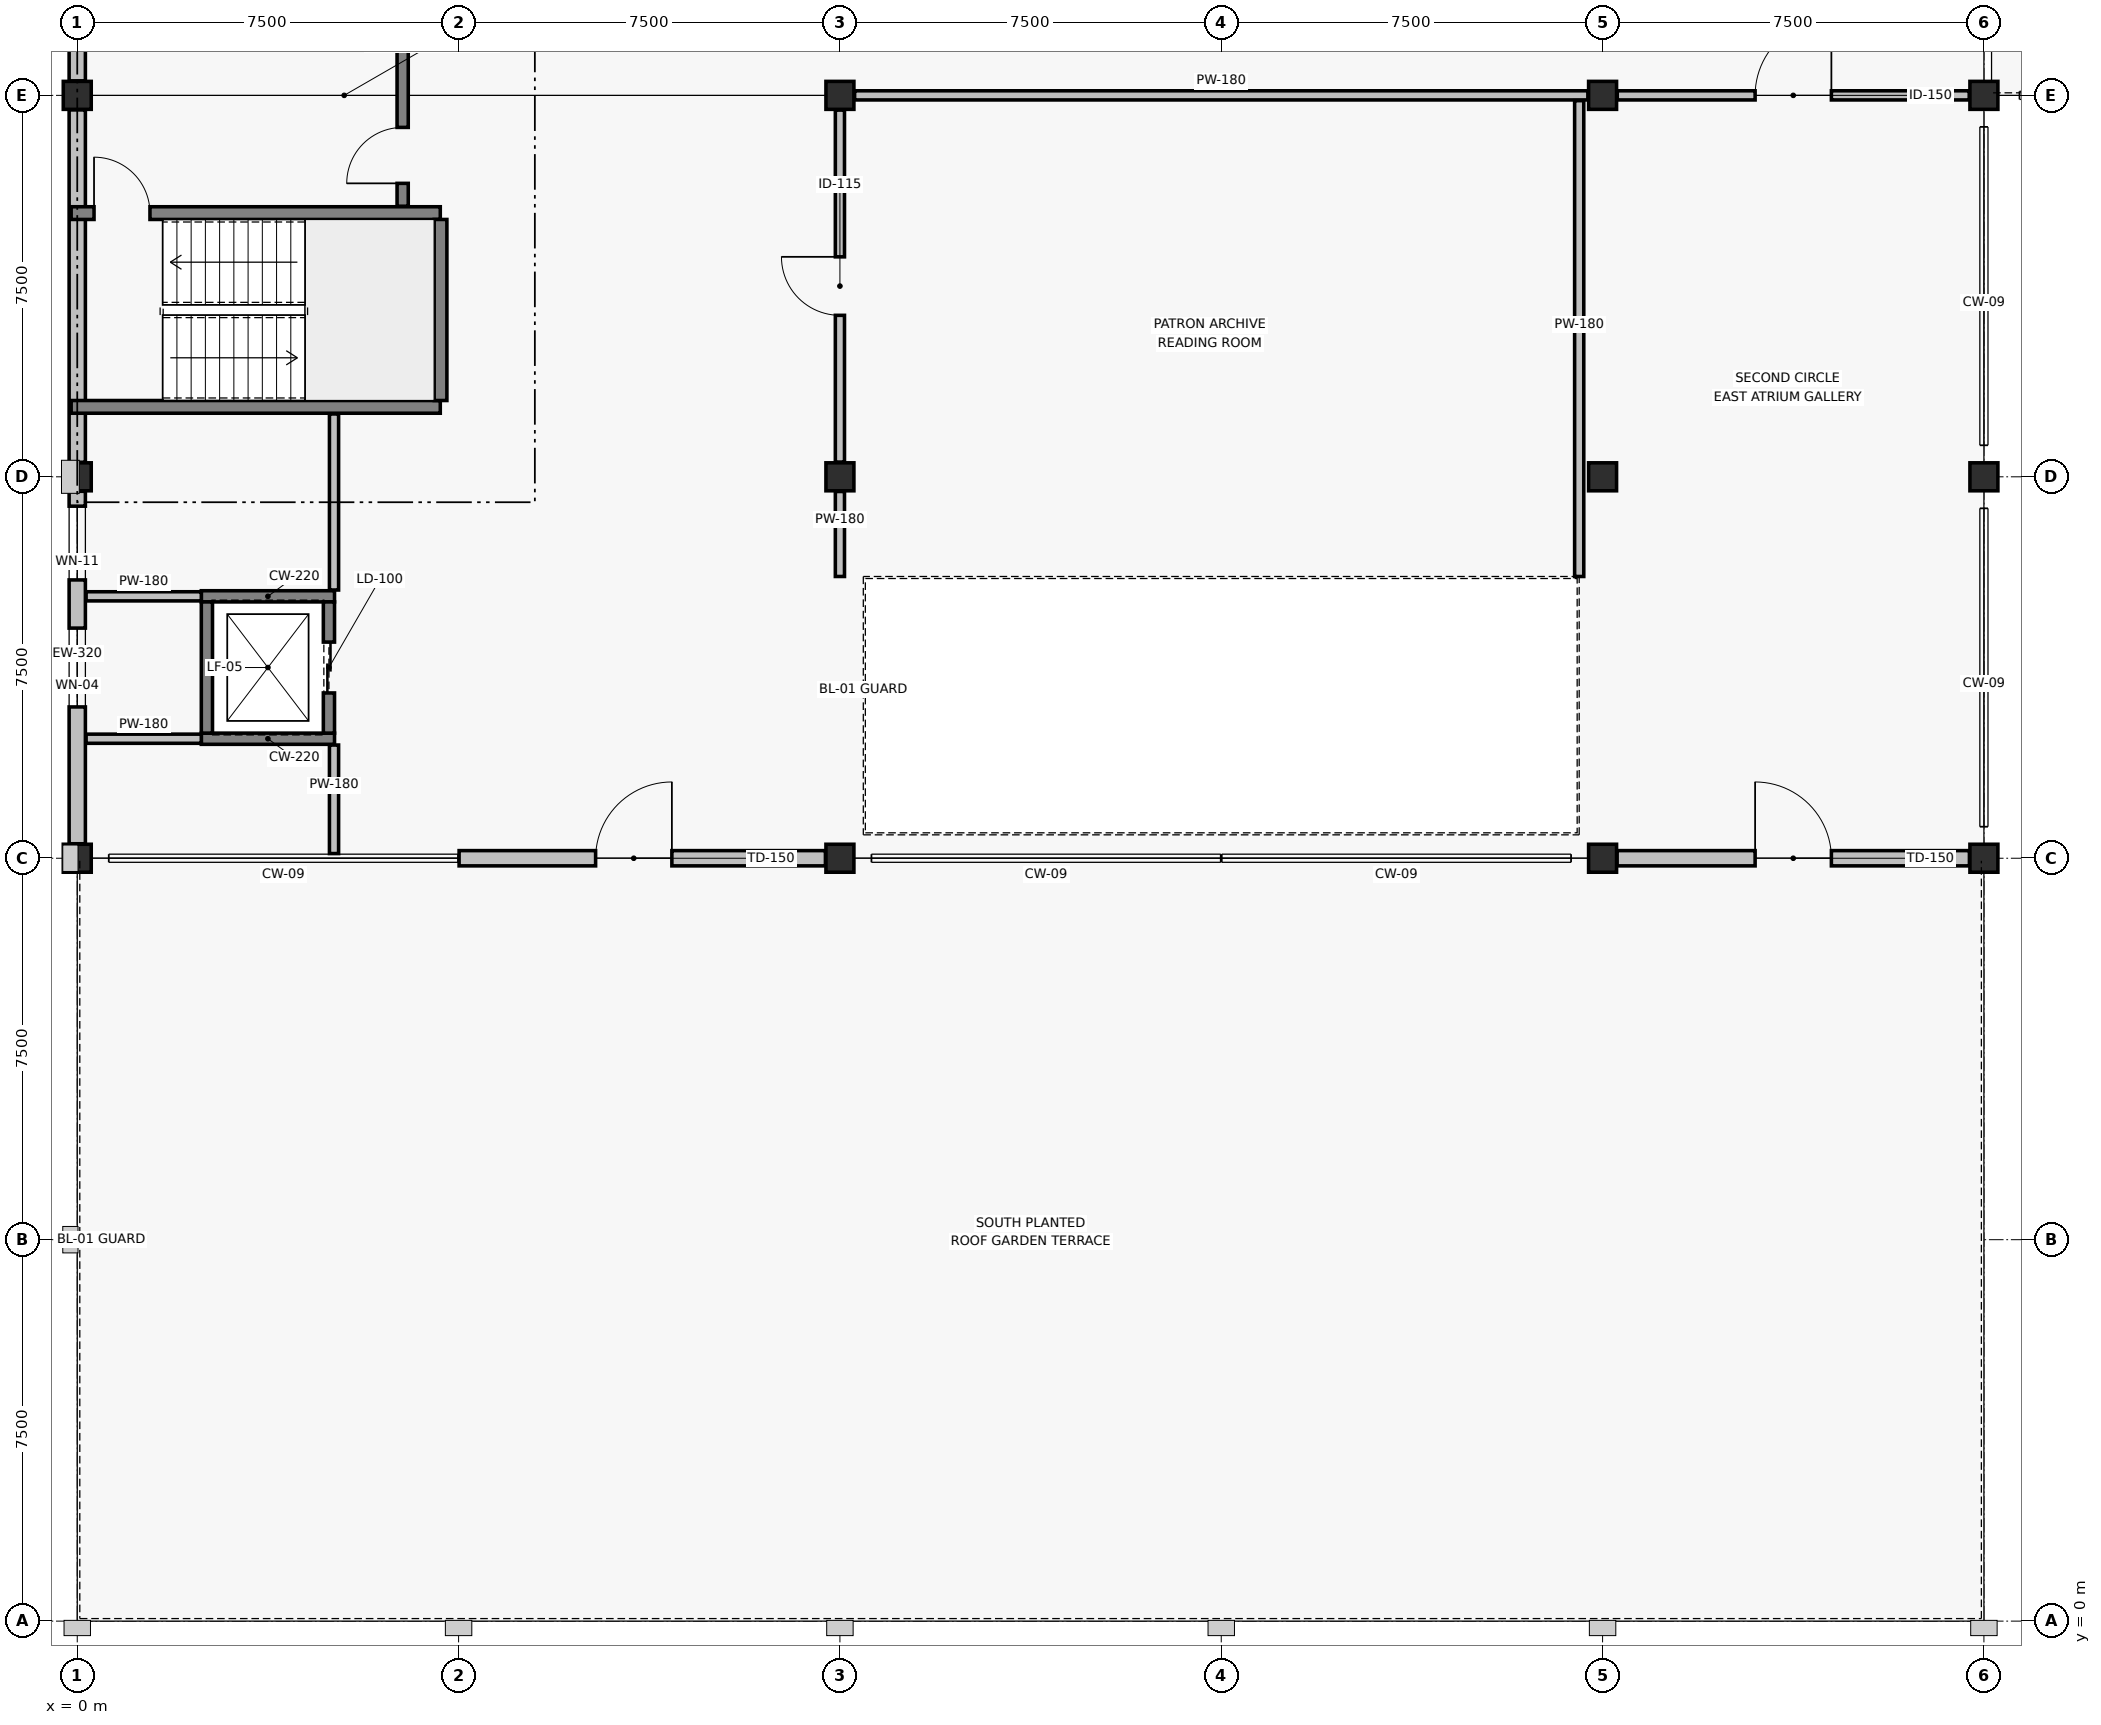
"""IFC4 building model, lengths in metres.
Left out: names, types, materials, properties, quantities, classifications, styles, units other than length and angle.
Written with IfcOpenShell. Run it as: python <this file> out.ifc"""

import sys

from ifc_helpers import new_model, si_unit, direction, frame, frame_2d, origin, origin_2d, place, context, subcontext, project, spatial, rectangle, extrude, element, fill, save


model = new_model("IFC4")
c1 = context("Model", 3, precision=1e-05, world=origin(), true_north=direction((0.0, 1.0)))
c2 = subcontext(c1, "Body", "Model", "MODEL_VIEW")
j1 = project(units=[si_unit("LENGTHUNIT", "METRE"), si_unit("PLANEANGLEUNIT", "RADIAN")], contexts=[c1])
p1 = place(None, origin())
s1 = spatial("IfcSite", under=j1, at=p1, CompositionType="ELEMENT")
p2 = place(p1, origin())
s2 = spatial("IfcBuilding", under=s1, at=p2, CompositionType="ELEMENT")
p3 = place(p2, frame((0.0, 0.0, 13.2)))
s3 = spatial("IfcBuildingStorey", under=s2, at=p3, CompositionType="ELEMENT", Elevation=13.2)
for number, where, z_axis, x_axis in (
    (1, (0.0, 15.0, 0.0), (0.0, 0.0, 1.0), (1.0, 0.0, 0.0)),
    (2, (0.0, 22.5, 0.0), (0.0, 0.0, 1.0), (1.0, 0.0, 0.0)),
    (3, (0.0, 30.0, 0.0), (0.0, 0.0, 1.0), (1.0, 0.0, 0.0)),
    (4, (15.0, 15.0, 0.0), (0.0, 0.0, 1.0), (1.0, 0.0, 0.0)),
    (5, (15.0, 22.5, 0.0), (0.0, 0.0, 1.0), (1.0, 0.0, 0.0)),
    (6, (15.0, 30.0, 0.0), (0.0, 0.0, 1.0), (1.0, 0.0, 0.0)),
    (7, (30.0, 15.0, 0.0), (0.0, 0.0, 1.0), (1.0, 0.0, 0.0)),
    (8, (30.0, 22.5, 0.0), (0.0, 0.0, 1.0), (1.0, 0.0, 0.0)),
    (9, (30.0, 30.0, 0.0), (0.0, 0.0, 1.0), (1.0, 0.0, 0.0)),
    (10, (37.5, 15.0, 0.0), (0.0, 0.0, 1.0), (1.0, 0.0, 0.0)),
    (11, (37.5, 22.5, 0.0), (0.0, 0.0, 1.0), (1.0, 0.0, 0.0)),
    (12, (37.5, 30.0, 0.0), (0.0, 0.0, 1.0), (1.0, 0.0, 0.0)),
):
    element("IfcColumn", number, at=place(p3, frame(where, z_axis=z_axis, x_axis=x_axis)), inside=s3, PredefinedType="COLUMN", context=c2, shape_type="SweptSolid", body=[
        extrude(rectangle(XDim=0.55, YDim=0.55, at=origin_2d()), origin(), (0.0, 0.0, 1.0), 3.9),
    ])
p4 = place(p3, frame((7.51, 15.0, 0.0), z_axis=(0.0, 0.0, 1.0), x_axis=(1.0, 0.0, 0.0)))
e13 = element("IfcWall", 13, at=p4, inside=s3, PredefinedType="SOLIDWALL", context=c2, shape_type="SweptSolid", body=[
    extrude(rectangle(XDim=7.205, YDim=0.3, at=frame_2d((3.603, 0.0))), origin(), (0.0, 0.0, 1.0), 2.59),
])
p5 = place(p4, frame((2.685, 0.0, 0.0)))
e14 = element("IfcOpeningElement", 14, at=p5, cuts=e13, PredefinedType="OPENING", context=c2, shape_type="SweptSolid", body=[
    extrude(rectangle(XDim=1.5, YDim=2.15, at=frame_2d((0.75, 1.075))), frame((0.0, 0.16, 0.0), z_axis=(0.0, -1.0, 0.0), x_axis=(1.0, 0.0, 0.0)), (0.0, 0.0, 1.0), 0.32),
])
p6 = place(p3, frame((30.285, 15.0, 0.0), z_axis=(0.0, 0.0, 1.0), x_axis=(1.0, 0.0, 0.0)))
e15 = element("IfcWall", 15, at=p6, inside=s3, PredefinedType="SOLIDWALL", context=c2, shape_type="SweptSolid", body=[
    extrude(rectangle(XDim=6.93, YDim=0.3, at=frame_2d((3.465, 0.0))), origin(), (0.0, 0.0, 1.0), 2.59),
])
p7 = place(p6, frame((2.715, 0.0, 0.0)))
e16 = element("IfcOpeningElement", 16, at=p7, cuts=e15, PredefinedType="OPENING", context=c2, shape_type="SweptSolid", body=[
    extrude(rectangle(XDim=1.5, YDim=2.15, at=frame_2d((0.75, 1.075))), frame((0.0, 0.16, 0.0), z_axis=(0.0, -1.0, 0.0), x_axis=(1.0, 0.0, 0.0)), (0.0, 0.0, 1.0), 0.32),
])
p8 = place(p3, frame((0.0, 15.285, 0.0), z_axis=(0.0, 0.0, 1.0), x_axis=(0.0, 1.0, 0.0)))
e17 = element("IfcWall", 17, at=p8, inside=s3, PredefinedType="SOLIDWALL", context=c2, shape_type="SweptSolid", body=[
    extrude(rectangle(XDim=6.93, YDim=0.32, at=frame_2d((3.465, 0.0))), origin(), (0.0, 0.0, 1.0), 2.59),
])
p9 = place(p8, frame((2.69, 0.0, 0.6)))
e18 = element("IfcOpeningElement", 18, at=p9, cuts=e17, PredefinedType="OPENING", context=c2, shape_type="SweptSolid", body=[
    extrude(rectangle(XDim=1.55, YDim=1.8, at=frame_2d((0.775, 0.9))), frame((0.0, 0.17, 0.0), z_axis=(0.0, -1.0, 0.0), x_axis=(1.0, 0.0, 0.0)), (0.0, 0.0, 1.0), 0.34),
])
p10 = place(p8, frame((5.188, 0.0, 0.6)))
e19 = element("IfcOpeningElement", 19, at=p10, cuts=e17, PredefinedType="OPENING", context=c2, shape_type="SweptSolid", body=[
    extrude(rectangle(XDim=1.45, YDim=1.3, at=frame_2d((0.725, 0.65))), frame((0.0, 0.17, 0.0), z_axis=(0.0, -1.0, 0.0), x_axis=(1.0, 0.0, 0.0)), (0.0, 0.0, 1.0), 0.34),
])
for number, where, z_axis, x_axis in (
    (20, (0.0, 22.785, 0.0), (0.0, 0.0, 1.0), (0.0, 1.0, 0.0)),
    (21, (0.0, 30.285, 0.0), (0.0, 0.0, 1.0), (0.0, 1.0, 0.0)),
):
    element("IfcWall", number, at=place(p3, frame(where, z_axis=z_axis, x_axis=x_axis)), inside=s3, PredefinedType="SOLIDWALL", context=c2, shape_type="SweptSolid", body=[
        extrude(rectangle(XDim=6.93, YDim=0.32, at=frame_2d((3.465, 0.0))), origin(), (0.0, 0.0, 1.0), 2.59),
    ])
p11 = place(p3, frame((-0.12, 23.875, 0.0), z_axis=(0.0, 0.0, 1.0), x_axis=(1.0, 0.0, 0.0)))
e22 = element("IfcWall", 22, at=p11, inside=s3, PredefinedType="SOLIDWALL", context=c2, shape_type="SweptSolid", body=[
    extrude(rectangle(XDim=7.26, YDim=0.25, at=frame_2d((3.63, 0.0))), origin(), (0.0, 0.0, 1.0), 3.62),
])
p12 = place(p3, frame((-0.12, 27.685, 0.0), z_axis=(0.0, 0.0, 1.0), x_axis=(1.0, 0.0, 0.0)))
e23 = element("IfcWall", 23, at=p12, inside=s3, PredefinedType="SOLIDWALL", context=c2, shape_type="SweptSolid", body=[
    extrude(rectangle(XDim=7.26, YDim=0.25, at=frame_2d((3.63, 0.0))), origin(), (0.0, 0.0, 1.0), 3.62),
])
p13 = place(p12, frame((0.45, 0.0, 0.0)))
e24 = element("IfcOpeningElement", 24, at=p13, cuts=e23, PredefinedType="OPENING", context=c2, shape_type="SweptSolid", body=[
    extrude(rectangle(XDim=1.1, YDim=2.15, at=frame_2d((0.55, 1.075))), frame((0.0, 0.135, 0.0), z_axis=(0.0, -1.0, 0.0), x_axis=(1.0, 0.0, 0.0)), (0.0, 0.0, 1.0), 0.27),
])
p14 = place(p3, frame((7.145, 24.0, 0.0), z_axis=(0.0, 0.0, 1.0), x_axis=(0.0, 1.0, 0.0)))
e25 = element("IfcWall", 25, at=p14, inside=s3, PredefinedType="SOLIDWALL", context=c2, shape_type="SweptSolid", body=[
    extrude(rectangle(XDim=3.56, YDim=0.25, at=frame_2d((1.78, 0.0))), origin(), (0.0, 0.0, 1.0), 3.62),
])
for number, where, z_axis, x_axis in (
    (26, (2.44, 17.35, 0.0), (0.0, 0.0, 1.0), (1.0, 0.0, 0.0)),
    (27, (2.44, 20.15, 0.0), (0.0, 0.0, 1.0), (1.0, 0.0, 0.0)),
):
    element("IfcWall", number, at=place(p3, frame(where, z_axis=z_axis, x_axis=x_axis)), inside=s3, PredefinedType="SOLIDWALL", context=c2, shape_type="SweptSolid", body=[
        extrude(rectangle(XDim=2.62, YDim=0.22, at=frame_2d((1.31, 0.0))), origin(), (0.0, 0.0, 1.0), 3.62),
    ])
p15 = place(p3, frame((2.55, 17.46, 0.0), z_axis=(0.0, 0.0, 1.0), x_axis=(0.0, 1.0, 0.0)))
e28 = element("IfcWall", 28, at=p15, inside=s3, PredefinedType="SOLIDWALL", context=c2, shape_type="SweptSolid", body=[
    extrude(rectangle(XDim=2.58, YDim=0.22, at=frame_2d((1.29, 0.0))), origin(), (0.0, 0.0, 1.0), 3.62),
])
p16 = place(p3, frame((4.95, 17.46, 0.0), z_axis=(0.0, 0.0, 1.0), x_axis=(0.0, 1.0, 0.0)))
e29 = element("IfcWall", 29, at=p16, inside=s3, PredefinedType="SOLIDWALL", context=c2, shape_type="SweptSolid", body=[
    extrude(rectangle(XDim=2.58, YDim=0.22, at=frame_2d((1.29, 0.0))), origin(), (0.0, 0.0, 1.0), 3.62),
])
p17 = place(p16, frame((0.79, 0.0, 0.0)))
e30 = element("IfcOpeningElement", 30, at=p17, cuts=e29, PredefinedType="OPENING", context=c2, shape_type="SweptSolid", body=[
    extrude(rectangle(XDim=1.0, YDim=2.15, at=frame_2d((0.5, 1.075))), frame((0.0, 0.12, 0.0), z_axis=(0.0, -1.0, 0.0), x_axis=(1.0, 0.0, 0.0)), (0.0, 0.0, 1.0), 0.24),
])
p18 = place(p3, frame((6.4, 27.82, 0.0), z_axis=(0.0, 0.0, 1.0), x_axis=(0.0, 1.0, 0.0)))
e31 = element("IfcWall", 31, at=p18, inside=s3, PredefinedType="SOLIDWALL", context=c2, shape_type="SweptSolid", body=[
    extrude(rectangle(XDim=4.31, YDim=0.22, at=frame_2d((2.155, 0.0))), origin(), (0.0, 0.0, 1.0), 3.62),
])
p19 = place(p18, frame((0.45, 0.0, 0.0)))
e32 = element("IfcOpeningElement", 32, at=p19, cuts=e31, PredefinedType="OPENING", context=c2, shape_type="SweptSolid", body=[
    extrude(rectangle(XDim=1.1, YDim=2.15, at=frame_2d((0.55, 1.075))), frame((0.0, 0.12, 0.0), z_axis=(0.0, -1.0, 0.0), x_axis=(1.0, 0.0, 0.0)), (0.0, 0.0, 1.0), 0.24),
])
for number, where, z_axis, x_axis in (
    (33, (0.174, 17.35, 0.0), (0.0, 0.0, 1.0), (1.0, 0.0, 0.0)),
    (34, (0.174, 20.15, 0.0), (0.0, 0.0, 1.0), (1.0, 0.0, 0.0)),
):
    element("IfcWall", number, at=place(p3, frame(where, z_axis=z_axis, x_axis=x_axis)), inside=s3, PredefinedType="PARTITIONING", context=c2, shape_type="SweptSolid", body=[
        extrude(rectangle(XDim=2.266, YDim=0.18, at=frame_2d((1.133, 0.0))), origin(), (0.0, 0.0, 1.0), 2.97),
    ])
p20 = place(p3, frame((5.05, 15.092, 0.0), z_axis=(0.0, 0.0, 1.0), x_axis=(0.0, 1.0, 0.0)))
e35 = element("IfcWall", 35, at=p20, inside=s3, PredefinedType="PARTITIONING", context=c2, shape_type="SweptSolid", body=[
    extrude(rectangle(XDim=2.134, YDim=0.18, at=frame_2d((1.067, 0.0))), origin(), (0.0, 0.0, 1.0), 2.59),
])
p21 = place(p3, frame((5.05, 20.274, 0.0), z_axis=(0.0, 0.0, 1.0), x_axis=(0.0, 1.0, 0.0)))
e36 = element("IfcWall", 36, at=p21, inside=s3, PredefinedType="PARTITIONING", context=c2, shape_type="SweptSolid", body=[
    extrude(rectangle(XDim=3.462, YDim=0.18, at=frame_2d((1.731, 0.0))), origin(), (0.0, 0.0, 1.0), 2.59),
])
p22 = place(p3, frame((15.289, 30.0, 0.0), z_axis=(0.0, 0.0, 1.0), x_axis=(1.0, 0.0, 0.0)))
e37 = element("IfcWall", 37, at=p22, inside=s3, PredefinedType="PARTITIONING", context=c2, shape_type="SweptSolid", body=[
    extrude(rectangle(XDim=14.422, YDim=0.18, at=frame_2d((7.211, 0.0))), origin(), (0.0, 0.0, 1.0), 2.59),
])
p23 = place(p3, frame((30.289, 30.0, 0.0), z_axis=(0.0, 0.0, 1.0), x_axis=(1.0, 0.0, 0.0)))
e38 = element("IfcWall", 38, at=p23, inside=s3, PredefinedType="PARTITIONING", context=c2, shape_type="SweptSolid", body=[
    extrude(rectangle(XDim=6.922, YDim=0.18, at=frame_2d((3.461, 0.0))), origin(), (0.0, 0.0, 1.0), 2.59),
])
p24 = place(p23, frame((2.711, 0.0, 0.0)))
e39 = element("IfcOpeningElement", 39, at=p24, cuts=e38, PredefinedType="OPENING", context=c2, shape_type="SweptSolid", body=[
    extrude(rectangle(XDim=1.5, YDim=2.16, at=frame_2d((0.75, 1.08))), frame((0.0, 0.1, 0.0), z_axis=(0.0, -1.0, 0.0), x_axis=(1.0, 0.0, 0.0)), (0.0, 0.0, 1.0), 0.2),
])
p25 = place(p3, frame((29.54, 20.54, 0.0), z_axis=(0.0, 0.0, 1.0), x_axis=(0.0, 1.0, 0.0)))
e40 = element("IfcWall", 40, at=p25, inside=s3, PredefinedType="PARTITIONING", context=c2, shape_type="SweptSolid", body=[
    extrude(rectangle(XDim=9.356, YDim=0.18, at=frame_2d((4.678, 0.0))), origin(), (0.0, 0.0, 1.0), 2.59),
])
p26 = place(p3, frame((15.0, 20.54, 0.0), z_axis=(0.0, 0.0, 1.0), x_axis=(0.0, 1.0, 0.0)))
e41 = element("IfcWall", 41, at=p26, inside=s3, PredefinedType="PARTITIONING", context=c2, shape_type="SweptSolid", body=[
    extrude(rectangle(XDim=1.671, YDim=0.18, at=frame_2d((0.835, 0.0))), origin(), (0.0, 0.0, 1.0), 2.59),
])
p27 = place(p3, frame((15.0, 22.789, 0.0), z_axis=(0.0, 0.0, 1.0), x_axis=(0.0, 1.0, 0.0)))
e42 = element("IfcWall", 42, at=p27, inside=s3, PredefinedType="PARTITIONING", context=c2, shape_type="SweptSolid", body=[
    extrude(rectangle(XDim=6.922, YDim=0.18, at=frame_2d((3.461, 0.0))), origin(), (0.0, 0.0, 1.0), 2.59),
])
p28 = place(p27, frame((2.886, 0.0, 0.0)))
e43 = element("IfcOpeningElement", 43, at=p28, cuts=e42, PredefinedType="OPENING", context=c2, shape_type="SweptSolid", body=[
    extrude(rectangle(XDim=1.15, YDim=2.14, at=frame_2d((0.575, 1.07))), frame((0.0, 0.1, 0.0), z_axis=(0.0, -1.0, 0.0), x_axis=(1.0, 0.0, 0.0)), (0.0, 0.0, 1.0), 0.2),
])
p29 = place(p5, frame((1.5, 0.0, 0.0), z_axis=(0.0, 0.0, 1.0), x_axis=(-1.0, 0.0, 0.0)))
e44 = element("IfcDoor", 44, at=p29, inside=s3, OperationType="SINGLE_SWING_LEFT", PredefinedType="DOOR", context=c2, shape_type="SweptSolid", body=[
    extrude(rectangle(XDim=1.5, YDim=2.15, at=frame_2d((0.75, 1.075))), frame((0.0, 0.025, 0.0), z_axis=(0.0, -1.0, 0.0), x_axis=(1.0, 0.0, 0.0)), (0.0, 0.0, 1.0), 0.05),
])
fill(e14, e44)
p30 = place(p7, frame((1.5, 0.0, 0.0), z_axis=(0.0, 0.0, 1.0), x_axis=(-1.0, 0.0, 0.0)))
e45 = element("IfcDoor", 45, at=p30, inside=s3, OperationType="SINGLE_SWING_RIGHT", PredefinedType="DOOR", context=c2, shape_type="SweptSolid", body=[
    extrude(rectangle(XDim=1.5, YDim=2.15, at=frame_2d((0.75, 1.075))), frame((0.0, 0.025, 0.0), z_axis=(0.0, -1.0, 0.0), x_axis=(1.0, 0.0, 0.0)), (0.0, 0.0, 1.0), 0.05),
])
fill(e16, e45)
p31 = place(p9, origin())
e46 = element("IfcWindow", 46, at=p31, inside=s3, PartitioningType="SINGLE_PANEL", PredefinedType="WINDOW", context=c2, shape_type="SweptSolid", body=[
    extrude(rectangle(XDim=1.55, YDim=1.8, at=frame_2d((0.775, 0.9))), frame((0.0, 0.03, 0.0), z_axis=(0.0, -1.0, 0.0), x_axis=(1.0, 0.0, 0.0)), (0.0, 0.0, 1.0), 0.06),
])
fill(e18, e46)
p32 = place(p10, origin())
e47 = element("IfcWindow", 47, at=p32, inside=s3, PartitioningType="SINGLE_PANEL", PredefinedType="WINDOW", context=c2, shape_type="SweptSolid", body=[
    extrude(rectangle(XDim=1.45, YDim=1.3, at=frame_2d((0.725, 0.65))), frame((0.0, 0.03, 0.0), z_axis=(0.0, -1.0, 0.0), x_axis=(1.0, 0.0, 0.0)), (0.0, 0.0, 1.0), 0.06),
])
fill(e19, e47)
p33 = place(p13, origin())
e48 = element("IfcDoor", 48, at=p33, inside=s3, OperationType="SINGLE_SWING_LEFT", PredefinedType="DOOR", context=c2, shape_type="SweptSolid", body=[
    extrude(rectangle(XDim=1.1, YDim=2.15, at=frame_2d((0.55, 1.075))), frame((0.0, 0.025, 0.0), z_axis=(0.0, -1.0, 0.0), x_axis=(1.0, 0.0, 0.0)), (0.0, 0.0, 1.0), 0.05),
])
fill(e24, e48)
p34 = place(p17, origin())
e49 = element("IfcDoor", 49, at=p34, inside=s3, OperationType="SLIDING_TO_LEFT", PredefinedType="DOOR", context=c2, shape_type="SweptSolid", body=[
    extrude(rectangle(XDim=1.0, YDim=2.15, at=frame_2d((0.5, 1.075))), frame((0.0, 0.025, 0.0), z_axis=(0.0, -1.0, 0.0), x_axis=(1.0, 0.0, 0.0)), (0.0, 0.0, 1.0), 0.05),
])
fill(e30, e49)
p35 = place(p19, origin())
e50 = element("IfcDoor", 50, at=p35, inside=s3, OperationType="SINGLE_SWING_LEFT", PredefinedType="DOOR", context=c2, shape_type="SweptSolid", body=[
    extrude(rectangle(XDim=1.1, YDim=2.15, at=frame_2d((0.55, 1.075))), frame((0.0, 0.025, 0.0), z_axis=(0.0, -1.0, 0.0), x_axis=(1.0, 0.0, 0.0)), (0.0, 0.0, 1.0), 0.05),
])
fill(e32, e50)
p36 = place(p24, origin())
e51 = element("IfcDoor", 51, at=p36, inside=s3, OperationType="SINGLE_SWING_RIGHT", PredefinedType="DOOR", context=c2, shape_type="SweptSolid", body=[
    extrude(rectangle(XDim=1.5, YDim=2.16, at=frame_2d((0.75, 1.08))), frame((0.0, 0.025, 0.0), z_axis=(0.0, -1.0, 0.0), x_axis=(1.0, 0.0, 0.0)), (0.0, 0.0, 1.0), 0.05),
])
fill(e39, e51)
p37 = place(p28, origin())
e52 = element("IfcDoor", 52, at=p37, inside=s3, OperationType="SINGLE_SWING_RIGHT", PredefinedType="DOOR", context=c2, shape_type="SweptSolid", body=[
    extrude(rectangle(XDim=1.15, YDim=2.14, at=frame_2d((0.575, 1.07))), frame((0.0, 0.025, 0.0), z_axis=(0.0, -1.0, 0.0), x_axis=(1.0, 0.0, 0.0)), (0.0, 0.0, 1.0), 0.05),
])
fill(e43, e52)
save(model, sys.argv[1])
